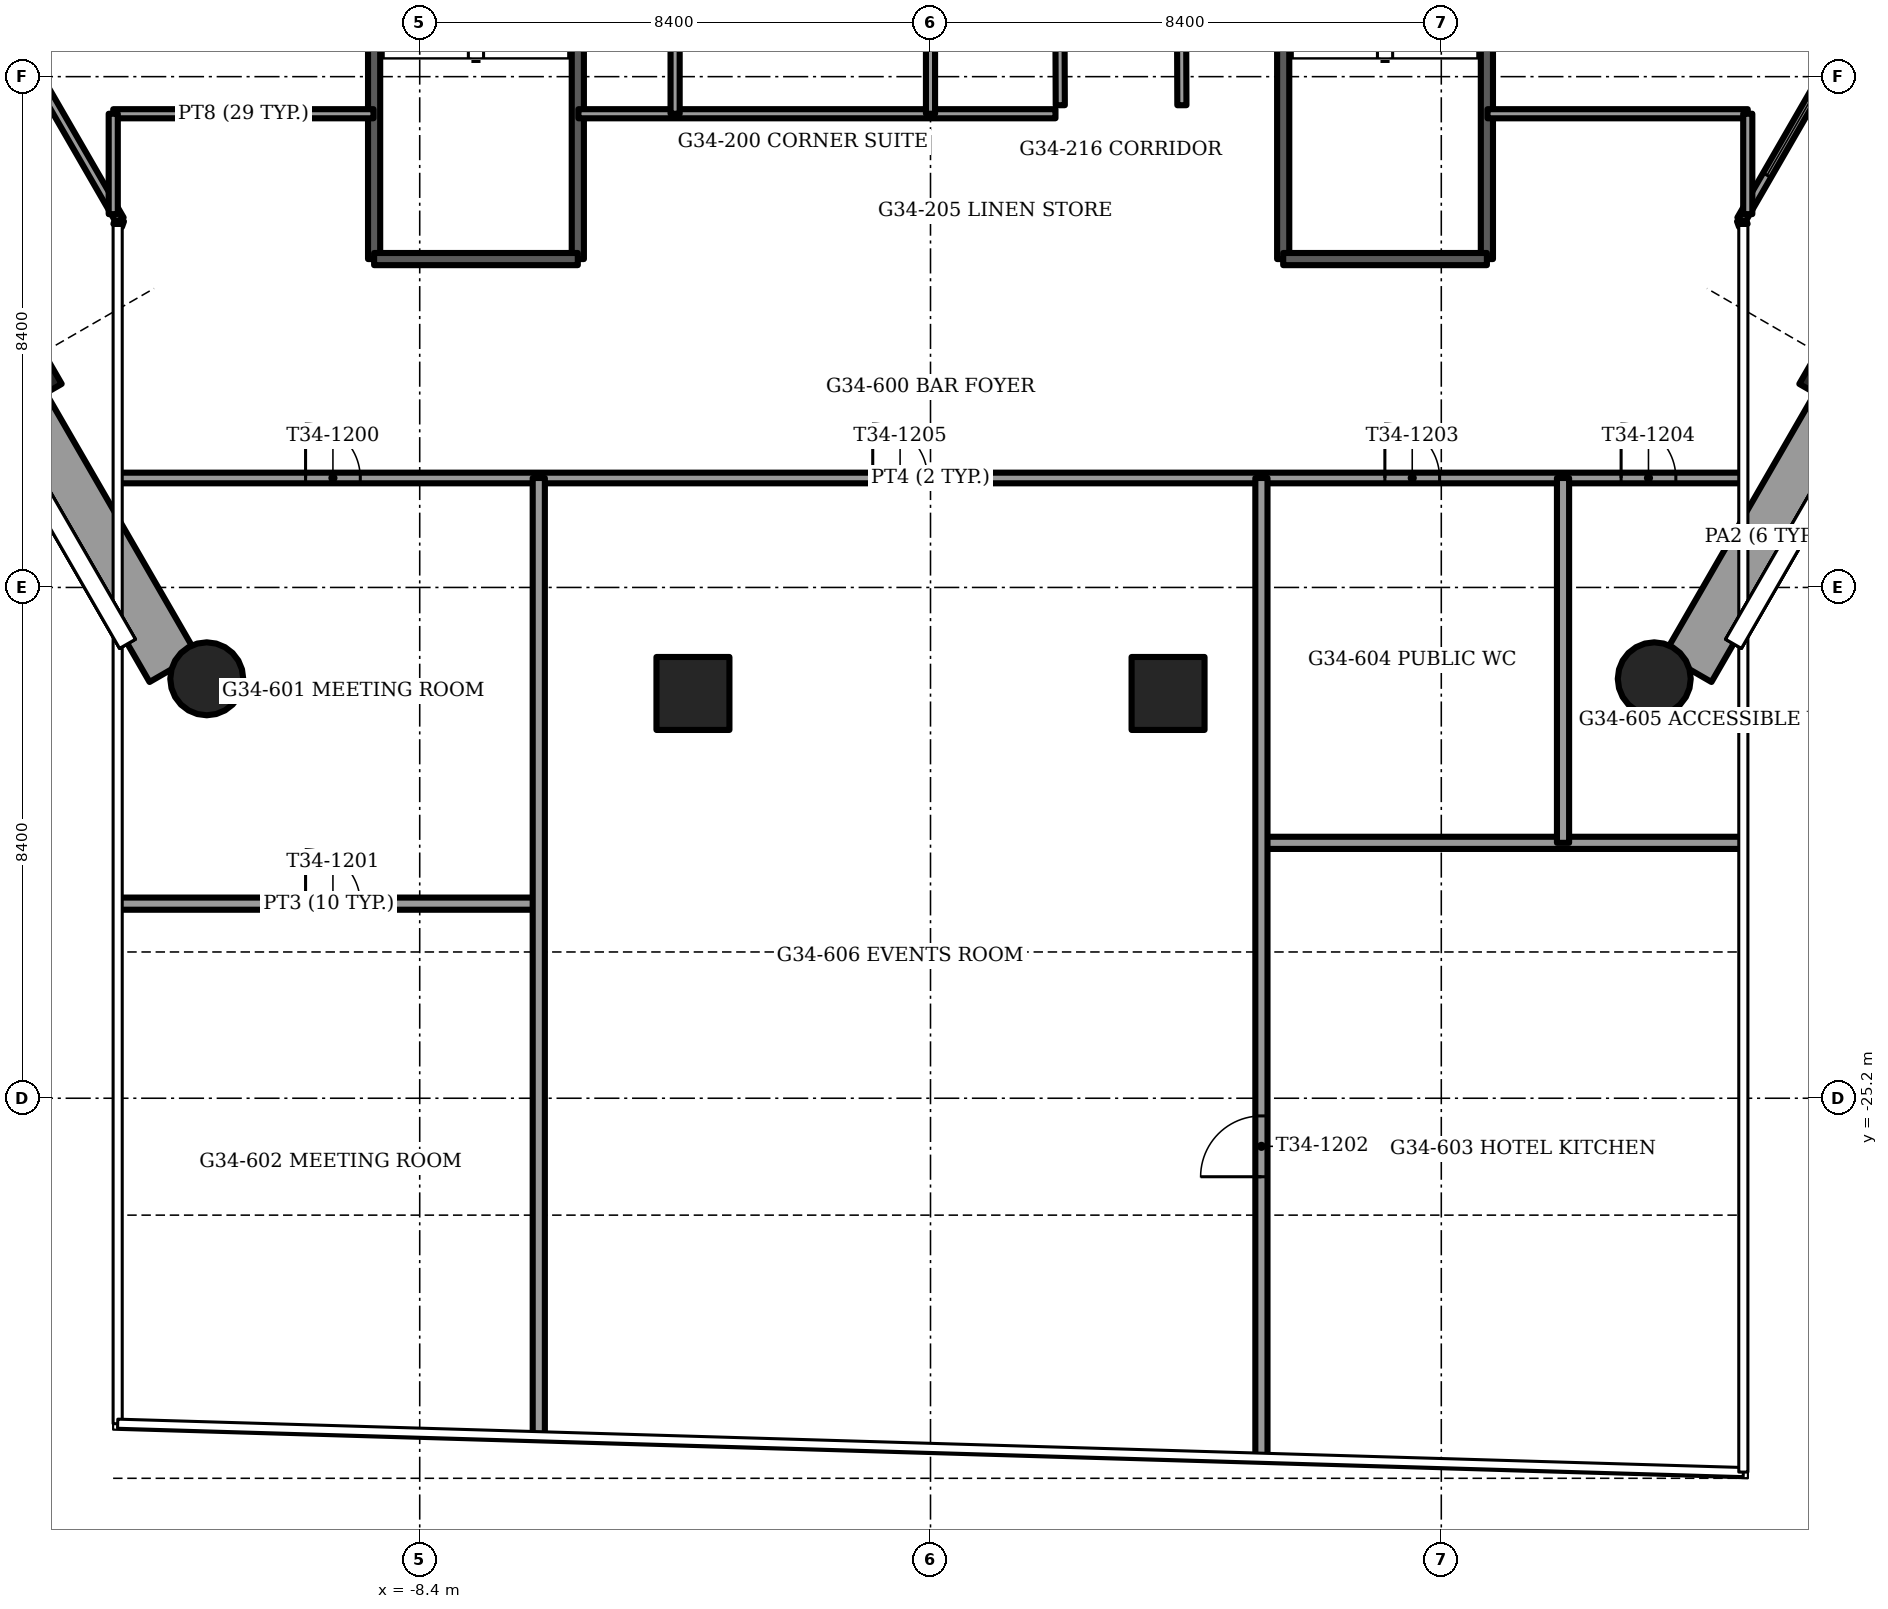
"""IFC4 building model, lengths in metres.
Left out: names, types, materials, properties, quantities, classifications, styles, units other than length and angle.
Written with IfcOpenShell. Run it as: python <this file> out.ifc"""

import sys

from ifc_helpers import new_model, si_unit, direction, frame, frame_2d, origin, origin_2d, place, context, subcontext, project, spatial, rectangle, circle, extrude, element, fill, save


model = new_model("IFC4")
c1 = context("Model", 3, precision=1e-05, world=origin(), true_north=direction((0.0, 1.0)))
c2 = subcontext(c1, "Body", "Model", "MODEL_VIEW")
j1 = project(units=[si_unit("LENGTHUNIT", "METRE"), si_unit("PLANEANGLEUNIT", "RADIAN")], contexts=[c1])
p1 = place(None, origin())
s1 = spatial("IfcSite", under=j1, at=p1, CompositionType="ELEMENT")
p2 = place(p1, origin())
s2 = spatial("IfcBuilding", under=s1, at=p2, CompositionType="ELEMENT")
p3 = place(p2, frame((0.0, 0.0, 138.5)))
s3 = spatial("IfcBuildingStorey", under=s2, at=p3, CompositionType="ELEMENT", Elevation=138.5)
for number, where, z_axis, x_axis in (
    (1, (-11.902, -18.302, -1.2), (0.0, 0.0, 1.0), (1.0, 0.0, 0.0)),
    (2, (11.902, -18.302, -1.2), (0.0, 0.0, 1.0), (1.0, 0.0, 0.0)),
):
    element("IfcColumn", number, at=place(p3, frame(where, z_axis=z_axis, x_axis=x_axis)), inside=s3, PredefinedType="COLUMN", context=c2, shape_type="SweptSolid", body=[
        extrude(circle(Radius=0.6, at=origin_2d()), origin(), (0.0, 0.0, 1.0), 3.75),
    ])
for number, where, z_axis, x_axis in (
    (3, (-15.107, -13.233, -1.2), (0.0, 0.0, 1.0), (-0.5, 0.866, 0.0)),
    (4, (-3.907, -18.543, -1.2), (0.0, 0.0, 1.0), (-1.0, 0.0, 0.0)),
    (5, (3.907, -18.543, -1.2), (0.0, 0.0, 1.0), (-1.0, 0.0, 0.0)),
    (6, (15.107, -13.233, -1.2), (0.0, 0.0, 1.0), (-0.5, -0.866, 0.0)),
):
    element("IfcColumn", number, at=place(p3, frame(where, z_axis=z_axis, x_axis=x_axis)), inside=s3, PredefinedType="COLUMN", context=c2, shape_type="SweptSolid", body=[
        extrude(rectangle(XDim=1.2, YDim=1.2, at=origin_2d()), origin(), (0.0, 0.0, 1.0), 3.75),
    ])
for number, where, z_axis, x_axis in (
    (7, (-14.952, -13.802, 0.0), (0.0, 0.0, 1.0), (0.5, -0.866, 0.0)),
    (8, (12.454, -18.13, 0.0), (0.0, 0.0, 1.0), (0.5, 0.866, 0.0)),
):
    element("IfcWall", number, at=place(p3, frame(where, z_axis=z_axis, x_axis=x_axis)), inside=s3, PredefinedType="PARAPET", context=c2, shape_type="SweptSolid", body=[
        extrude(rectangle(XDim=4.997, YDim=0.9, at=frame_2d((2.499, 0.0))), origin(), (0.0, 0.0, 1.0), 1.1),
    ])
p4 = place(p3, frame((-18.568, -1.689, 0.0), z_axis=(0.0, 0.0, 1.0), x_axis=(0.499994317138, -0.866028684761, 0.0)))
e9 = element("IfcWall", 9, at=p4, inside=s3, PredefinedType="SOLIDWALL", context=c2, shape_type="SweptSolid", body=[
    extrude(rectangle(XDim=10.468, YDim=0.15, at=frame_2d((5.234, 0.0))), origin(), (0.0, 0.0, 1.0), 3.45),
])
p5 = place(p4, frame((3.448, 0.0, 0.15)))
e10 = element("IfcOpeningElement", 10, at=p5, cuts=e9, PredefinedType="OPENING", context=c2, shape_type="SweptSolid", body=[
    extrude(rectangle(XDim=1.5, YDim=2.2, at=frame_2d((0.75, 1.1))), frame((0.0, 0.075, 0.0), z_axis=(0.0, -1.0, 0.0), x_axis=(1.0, 0.0, 0.0)), (0.0, 0.0, 1.0), 0.15),
])
p6 = place(p4, frame((6.021, 0.0, 0.15)))
e11 = element("IfcOpeningElement", 11, at=p6, cuts=e9, PredefinedType="OPENING", context=c2, shape_type="SweptSolid", body=[
    extrude(rectangle(XDim=1.7, YDim=2.2, at=frame_2d((0.85, 1.1))), frame((0.0, 0.075, 0.0), z_axis=(0.0, -1.0, 0.0), x_axis=(1.0, 0.0, 0.0)), (0.0, 0.0, 1.0), 0.15),
])
p7 = place(p3, frame((13.334, -10.755, 0.0), z_axis=(0.0, 0.0, 1.0), x_axis=(0.499994317138, 0.866028684761, 0.0)))
e12 = element("IfcWall", 12, at=p7, inside=s3, PredefinedType="SOLIDWALL", context=c2, shape_type="SweptSolid", body=[
    extrude(rectangle(XDim=10.468, YDim=0.15, at=frame_2d((5.234, 0.0))), origin(), (0.0, 0.0, 1.0), 3.45),
])
p8 = place(p7, frame((0.847, 0.0, 0.15)))
e13 = element("IfcOpeningElement", 13, at=p8, cuts=e12, PredefinedType="OPENING", context=c2, shape_type="SweptSolid", body=[
    extrude(rectangle(XDim=1.7, YDim=2.2, at=frame_2d((0.85, 1.1))), frame((0.0, 0.075, 0.0), z_axis=(0.0, -1.0, 0.0), x_axis=(1.0, 0.0, 0.0)), (0.0, 0.0, 1.0), 0.15),
])
p9 = place(p7, frame((6.322, 0.0, 0.15)))
e14 = element("IfcOpeningElement", 14, at=p9, cuts=e12, PredefinedType="OPENING", context=c2, shape_type="SweptSolid", body=[
    extrude(rectangle(XDim=1.5, YDim=2.2, at=frame_2d((0.75, 1.1))), frame((0.0, 0.075, 0.0), z_axis=(0.0, -1.0, 0.0), x_axis=(1.0, 0.0, 0.0)), (0.0, 0.0, 1.0), 0.15),
])
for number, where, z_axis, x_axis in (
    (15, (-13.334, -10.755, 0.0), (0.0, 0.0, 1.0), (-0.338, -0.941, 0.0)),
    (16, (13.334, -10.755, 0.0), (0.0, 0.0, 1.0), (0.338, -0.941, 0.0)),
):
    element("IfcWall", number, at=place(p3, frame(where, z_axis=z_axis, x_axis=x_axis)), inside=s3, PredefinedType="SOLIDWALL", context=c2, shape_type="SweptSolid", body=[
        extrude(rectangle(XDim=0.098, YDim=0.15, at=frame_2d((0.049, 0.0))), origin(), (0.0, 0.0, 1.0), 3.45),
    ])
for number, where, z_axis, x_axis in (
    (17, (5.8, -3.7, -0.3), (0.0, 0.0, 1.0), (0.0, -1.0, 0.0)),
    (18, (9.15, -3.7, -0.3), (0.0, 0.0, 1.0), (0.0, -1.0, 0.0)),
):
    element("IfcWall", number, at=place(p3, frame(where, z_axis=z_axis, x_axis=x_axis)), inside=s3, PredefinedType="SOLIDWALL", context=c2, shape_type="SweptSolid", body=[
        extrude(rectangle(XDim=7.7, YDim=0.2, at=frame_2d((3.85, 0.0))), origin(), (0.0, 0.0, 1.0), 3.75),
    ])
p10 = place(p3, frame((5.8, -11.4, -0.3), z_axis=(0.0, 0.0, 1.0), x_axis=(1.0, 0.0, 0.0)))
e19 = element("IfcWall", 19, at=p10, inside=s3, PredefinedType="SOLIDWALL", context=c2, shape_type="SweptSolid", body=[
    extrude(rectangle(XDim=3.35, YDim=0.2, at=frame_2d((1.675, 0.0))), origin(), (0.0, 0.0, 1.0), 3.75),
])
for number, where, z_axis, x_axis in (
    (20, (-9.15, -3.7, -0.3), (0.0, 0.0, 1.0), (0.0, -1.0, 0.0)),
    (21, (-5.8, -3.7, -0.3), (0.0, 0.0, 1.0), (0.0, -1.0, 0.0)),
):
    element("IfcWall", number, at=place(p3, frame(where, z_axis=z_axis, x_axis=x_axis)), inside=s3, PredefinedType="SOLIDWALL", context=c2, shape_type="SweptSolid", body=[
        extrude(rectangle(XDim=7.7, YDim=0.2, at=frame_2d((3.85, 0.0))), origin(), (0.0, 0.0, 1.0), 3.75),
    ])
p11 = place(p3, frame((-9.15, -11.4, -0.3), z_axis=(0.0, 0.0, 1.0), x_axis=(1.0, 0.0, 0.0)))
e22 = element("IfcWall", 22, at=p11, inside=s3, PredefinedType="SOLIDWALL", context=c2, shape_type="SweptSolid", body=[
    extrude(rectangle(XDim=3.35, YDim=0.2, at=frame_2d((1.675, 0.0))), origin(), (0.0, 0.0, 1.0), 3.75),
])
p12 = place(p3, frame((-13.44, -9.01, 0.0), z_axis=(0.0, 0.0, 1.0), x_axis=(1.0, 0.0, 0.0)))
e23 = element("IfcWall", 23, at=p12, inside=s3, PredefinedType="PARTITIONING", context=c2, shape_type="SweptSolid", body=[
    extrude(rectangle(XDim=4.28, YDim=0.15, at=frame_2d((2.14, 0.0))), origin(), (0.0, 0.0, 1.0), 3.45),
])
p13 = place(p3, frame((-5.79, -9.01, 0.0), z_axis=(0.0, 0.0, 1.0), x_axis=(1.0, 0.0, 0.0)))
e24 = element("IfcWall", 24, at=p13, inside=s3, PredefinedType="PARTITIONING", context=c2, shape_type="SweptSolid", body=[
    extrude(rectangle(XDim=7.845, YDim=0.15, at=frame_2d((3.922, 0.0))), origin(), (0.0, 0.0, 1.0), 3.45),
])
p14 = place(p3, frame((9.16, -9.01, 0.0), z_axis=(0.0, 0.0, 1.0), x_axis=(1.0, 0.0, 0.0)))
e25 = element("IfcWall", 25, at=p14, inside=s3, PredefinedType="PARTITIONING", context=c2, shape_type="SweptSolid", body=[
    extrude(rectangle(XDim=4.28, YDim=0.15, at=frame_2d((2.14, 0.0))), origin(), (0.0, 0.0, 1.0), 3.45),
])
p15 = place(p3, frame((13.44, -10.661, 0.0), z_axis=(0.0, 0.0, 1.0), x_axis=(0.0, 1.0, 0.0)))
e26 = element("IfcWall", 26, at=p15, inside=s3, PredefinedType="PARTITIONING", context=c2, shape_type="SweptSolid", body=[
    extrude(rectangle(XDim=1.651, YDim=0.15, at=frame_2d((0.825, 0.0))), origin(), (0.0, 0.0, 1.0), 3.45),
])
p16 = place(p3, frame((0.0, -9.01, 0.0), z_axis=(0.0, 0.0, 1.0), x_axis=(0.0, 1.0, 0.0)))
e27 = element("IfcWall", 27, at=p16, inside=s3, PredefinedType="PARTITIONING", context=c2, shape_type="SweptSolid", body=[
    extrude(rectangle(XDim=5.31, YDim=0.15, at=frame_2d((2.655, 0.0))), origin(), (0.0, 0.0, 1.0), 3.45),
])
p17 = place(p3, frame((-4.2, -9.01, 0.0), z_axis=(0.0, 0.0, 1.0), x_axis=(0.0, 1.0, 0.0)))
e28 = element("IfcWall", 28, at=p17, inside=s3, PredefinedType="PARTITIONING", context=c2, shape_type="SweptSolid", body=[
    extrude(rectangle(XDim=5.31, YDim=0.15, at=frame_2d((2.655, 0.0))), origin(), (0.0, 0.0, 1.0), 3.45),
])
p18 = place(p17, frame((3.86, 0.0, 0.0)))
e29 = element("IfcOpeningElement", 29, at=p18, cuts=e28, PredefinedType="OPENING", context=c2, shape_type="SweptSolid", body=[
    extrude(rectangle(XDim=0.9, YDim=2.1, at=frame_2d((0.45, 1.05))), frame((0.0, 0.075, 0.0), z_axis=(0.0, -1.0, 0.0), x_axis=(1.0, 0.0, 0.0)), (0.0, 0.0, 1.0), 0.15),
])
p19 = place(p3, frame((-13.44, -10.661, 0.0), z_axis=(0.0, 0.0, 1.0), x_axis=(0.0, 1.0, 0.0)))
e30 = element("IfcWall", 30, at=p19, inside=s3, PredefinedType="PARTITIONING", context=c2, shape_type="SweptSolid", body=[
    extrude(rectangle(XDim=1.651, YDim=0.15, at=frame_2d((0.825, 0.0))), origin(), (0.0, 0.0, 1.0), 3.45),
])
p20 = place(p3, frame((4.134, -8.87, 0.0), z_axis=(0.0, 0.0, 1.0), x_axis=(-0.003683216269, 0.999993216936, 0.0)))
e31 = element("IfcWall", 31, at=p20, inside=s3, PredefinedType="PARTITIONING", context=c2, shape_type="SweptSolid", body=[
    extrude(rectangle(XDim=5.17, YDim=0.15, at=frame_2d((2.585, 0.0))), origin(), (0.0, 0.0, 1.0), 3.45),
])
p21 = place(p3, frame((2.134, -8.87, 0.0), z_axis=(0.0, 0.0, 1.0), x_axis=(-0.003686872276, 0.999993203463, 0.0)))
e32 = element("IfcWall", 32, at=p21, inside=s3, PredefinedType="PARTITIONING", context=c2, shape_type="SweptSolid", body=[
    extrude(rectangle(XDim=5.165, YDim=0.15, at=frame_2d((2.583, 0.0))), origin(), (0.0, 0.0, 1.0), 3.45),
])
p22 = place(p3, frame((-13.348, -15.0, 0.0), z_axis=(0.0, 0.0, 1.0), x_axis=(1.0, 0.0, 0.0)))
e33 = element("IfcWall", 33, at=p22, inside=s3, PredefinedType="PARTITIONING", context=c2, shape_type="SweptSolid", body=[
    extrude(rectangle(XDim=26.696, YDim=0.175, at=frame_2d((13.348, 0.0))), origin(), (0.0, 0.0, 1.0), 3.45),
])
p23 = place(p22, frame((3.071, 0.0, 0.0)))
e34 = element("IfcOpeningElement", 34, at=p23, cuts=e33, PredefinedType="OPENING", context=c2, shape_type="SweptSolid", body=[
    extrude(rectangle(XDim=0.9, YDim=2.1, at=frame_2d((0.45, 1.05))), frame((0.0, 0.087, 0.0), z_axis=(0.0, -1.0, 0.0), x_axis=(1.0, 0.0, 0.0)), (0.0, 0.0, 1.0), 0.175),
])
p24 = place(p22, frame((20.82, 0.0, 0.0)))
e35 = element("IfcOpeningElement", 35, at=p24, cuts=e33, PredefinedType="OPENING", context=c2, shape_type="SweptSolid", body=[
    extrude(rectangle(XDim=0.9, YDim=2.1, at=frame_2d((0.45, 1.05))), frame((0.0, 0.087, 0.0), z_axis=(0.0, -1.0, 0.0), x_axis=(1.0, 0.0, 0.0)), (0.0, 0.0, 1.0), 0.175),
])
p25 = place(p22, frame((24.705, 0.0, 0.0)))
e36 = element("IfcOpeningElement", 36, at=p25, cuts=e33, PredefinedType="OPENING", context=c2, shape_type="SweptSolid", body=[
    extrude(rectangle(XDim=0.9, YDim=2.1, at=frame_2d((0.45, 1.05))), frame((0.0, 0.087, 0.0), z_axis=(0.0, -1.0, 0.0), x_axis=(1.0, 0.0, 0.0)), (0.0, 0.0, 1.0), 0.175),
])
p26 = place(p22, frame((12.398, 0.0, 0.0)))
e37 = element("IfcOpeningElement", 37, at=p26, cuts=e33, PredefinedType="OPENING", context=c2, shape_type="SweptSolid", body=[
    extrude(rectangle(XDim=0.9, YDim=2.1, at=frame_2d((0.45, 1.05))), frame((0.0, 0.087, 0.0), z_axis=(0.0, -1.0, 0.0), x_axis=(1.0, 0.0, 0.0)), (0.0, 0.0, 1.0), 0.175),
])
p27 = place(p3, frame((-13.348, -22.0, 0.0), z_axis=(0.0, 0.0, 1.0), x_axis=(1.0, 0.0, 0.0)))
e38 = element("IfcWall", 38, at=p27, inside=s3, PredefinedType="PARTITIONING", context=c2, shape_type="SweptSolid", body=[
    extrude(rectangle(XDim=6.906, YDim=0.2, at=frame_2d((3.453, 0.0))), origin(), (0.0, 0.0, 1.0), 3.45),
])
p28 = place(p27, frame((3.071, 0.0, 0.0)))
e39 = element("IfcOpeningElement", 39, at=p28, cuts=e38, PredefinedType="OPENING", context=c2, shape_type="SweptSolid", body=[
    extrude(rectangle(XDim=0.9, YDim=2.1, at=frame_2d((0.45, 1.05))), frame((0.0, 0.1, 0.0), z_axis=(0.0, -1.0, 0.0), x_axis=(1.0, 0.0, 0.0)), (0.0, 0.0, 1.0), 0.2),
])
p29 = place(p3, frame((5.442, -21.0, 0.0), z_axis=(0.0, 0.0, 1.0), x_axis=(1.0, 0.0, 0.0)))
e40 = element("IfcWall", 40, at=p29, inside=s3, PredefinedType="PARTITIONING", context=c2, shape_type="SweptSolid", body=[
    extrude(rectangle(XDim=7.906, YDim=0.2, at=frame_2d((3.953, 0.0))), origin(), (0.0, 0.0, 1.0), 3.45),
])
p30 = place(p3, frame((-6.442, -30.739, 0.0), z_axis=(0.0, 0.0, 1.0), x_axis=(0.0, 1.0, 0.0)))
e41 = element("IfcWall", 41, at=p30, inside=s3, PredefinedType="PARTITIONING", context=c2, shape_type="SweptSolid", body=[
    extrude(rectangle(XDim=15.739, YDim=0.2, at=frame_2d((7.87, 0.0))), origin(), (0.0, 0.0, 1.0), 2.828),
])
p31 = place(p3, frame((5.442, -31.093, 0.0), z_axis=(0.0, 0.0, 1.0), x_axis=(0.0, 1.0, 0.0)))
e42 = element("IfcWall", 42, at=p31, inside=s3, PredefinedType="PARTITIONING", context=c2, shape_type="SweptSolid", body=[
    extrude(rectangle(XDim=16.093, YDim=0.2, at=frame_2d((8.046, 0.0))), origin(), (0.0, 0.0, 1.0), 2.828),
])
p32 = place(p31, frame((4.602, 0.0, 0.0)))
e43 = element("IfcOpeningElement", 43, at=p32, cuts=e42, PredefinedType="OPENING", context=c2, shape_type="SweptSolid", body=[
    extrude(rectangle(XDim=1.0, YDim=2.1, at=frame_2d((0.5, 1.05))), frame((0.0, 0.1, 0.0), z_axis=(0.0, -1.0, 0.0), x_axis=(1.0, 0.0, 0.0)), (0.0, 0.0, 1.0), 0.2),
])
p33 = place(p3, frame((10.402, -21.0, 0.0), z_axis=(0.0, 0.0, 1.0), x_axis=(0.0, 1.0, 0.0)))
e44 = element("IfcWall", 44, at=p33, inside=s3, PredefinedType="PARTITIONING", context=c2, shape_type="SweptSolid", body=[
    extrude(rectangle(XDim=6.0, YDim=0.2, at=frame_2d((3.0, 0.0))), origin(), (0.0, 0.0, 1.0), 3.45),
])
p34 = place(p8, origin())
e45 = element("IfcWindow", 45, at=p34, inside=s3, PartitioningType="SINGLE_PANEL", PredefinedType="WINDOW", context=c2, shape_type="SweptSolid", body=[
    extrude(rectangle(XDim=1.7, YDim=2.2, at=frame_2d((0.85, 1.1))), frame((0.0, 0.03, 0.0), z_axis=(0.0, -1.0, 0.0), x_axis=(1.0, 0.0, 0.0)), (0.0, 0.0, 1.0), 0.06),
])
fill(e13, e45)
p35 = place(p23, origin())
e46 = element("IfcDoor", 46, at=p35, inside=s3, OperationType="SINGLE_SWING_RIGHT", PredefinedType="DOOR", context=c2, shape_type="SweptSolid", body=[
    extrude(rectangle(XDim=0.9, YDim=2.1, at=frame_2d((0.45, 1.05))), frame((0.0, 0.025, 0.0), z_axis=(0.0, -1.0, 0.0), x_axis=(1.0, 0.0, 0.0)), (0.0, 0.0, 1.0), 0.05),
])
fill(e34, e46)
p36 = place(p28, origin())
e47 = element("IfcDoor", 47, at=p36, inside=s3, OperationType="SINGLE_SWING_LEFT", PredefinedType="DOOR", context=c2, shape_type="SweptSolid", body=[
    extrude(rectangle(XDim=0.9, YDim=2.1, at=frame_2d((0.45, 1.05))), frame((0.0, 0.025, 0.0), z_axis=(0.0, -1.0, 0.0), x_axis=(1.0, 0.0, 0.0)), (0.0, 0.0, 1.0), 0.05),
])
fill(e39, e47)
p37 = place(p32, origin())
e48 = element("IfcDoor", 48, at=p37, inside=s3, OperationType="SINGLE_SWING_RIGHT", PredefinedType="DOOR", context=c2, shape_type="SweptSolid", body=[
    extrude(rectangle(XDim=1.0, YDim=2.1, at=frame_2d((0.5, 1.05))), frame((0.0, 0.025, 0.0), z_axis=(0.0, -1.0, 0.0), x_axis=(1.0, 0.0, 0.0)), (0.0, 0.0, 1.0), 0.05),
])
fill(e43, e48)
p38 = place(p24, origin())
e49 = element("IfcDoor", 49, at=p38, inside=s3, OperationType="SINGLE_SWING_LEFT", PredefinedType="DOOR", context=c2, shape_type="SweptSolid", body=[
    extrude(rectangle(XDim=0.9, YDim=2.1, at=frame_2d((0.45, 1.05))), frame((0.0, 0.025, 0.0), z_axis=(0.0, -1.0, 0.0), x_axis=(1.0, 0.0, 0.0)), (0.0, 0.0, 1.0), 0.05),
])
fill(e35, e49)
p39 = place(p25, origin())
e50 = element("IfcDoor", 50, at=p39, inside=s3, OperationType="SINGLE_SWING_RIGHT", PredefinedType="DOOR", context=c2, shape_type="SweptSolid", body=[
    extrude(rectangle(XDim=0.9, YDim=2.1, at=frame_2d((0.45, 1.05))), frame((0.0, 0.025, 0.0), z_axis=(0.0, -1.0, 0.0), x_axis=(1.0, 0.0, 0.0)), (0.0, 0.0, 1.0), 0.05),
])
fill(e36, e50)
p40 = place(p26, origin())
e51 = element("IfcDoor", 51, at=p40, inside=s3, OperationType="SINGLE_SWING_LEFT", PredefinedType="DOOR", context=c2, shape_type="SweptSolid", body=[
    extrude(rectangle(XDim=0.9, YDim=2.1, at=frame_2d((0.45, 1.05))), frame((0.0, 0.025, 0.0), z_axis=(0.0, -1.0, 0.0), x_axis=(1.0, 0.0, 0.0)), (0.0, 0.0, 1.0), 0.05),
])
fill(e37, e51)
save(model, sys.argv[1])
